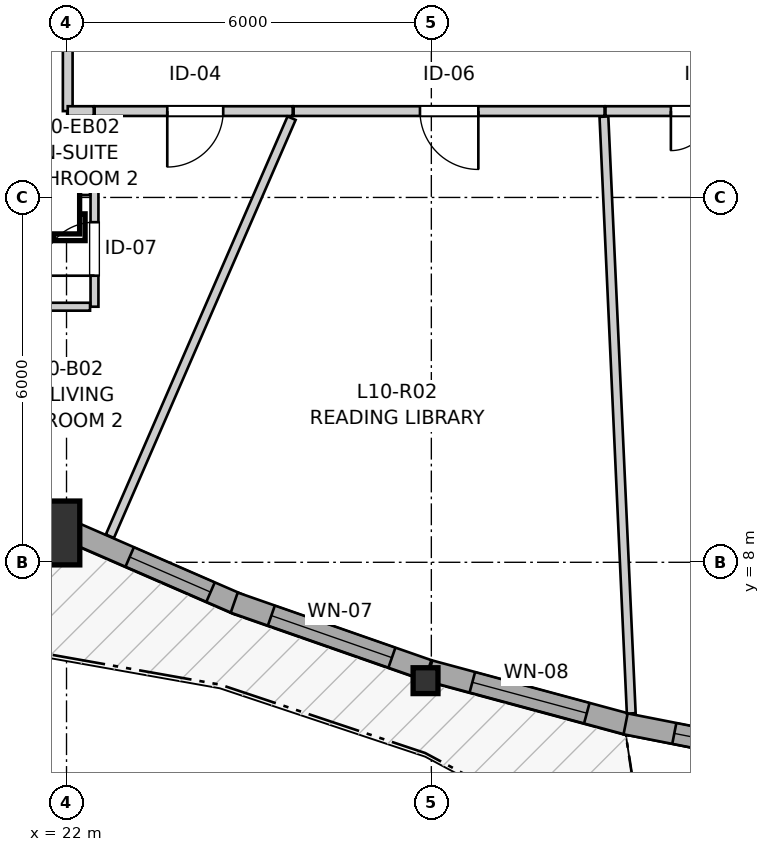
"""IFC4 building model, lengths in metres.
Left out: names, types, materials, properties, quantities, classifications, styles, units other than length and angle.
Written with IfcOpenShell. Run it as: python <this file> out.ifc"""

import sys

from ifc_helpers import new_model, si_unit, direction, frame, frame_2d, origin, origin_2d, place, context, subcontext, project, spatial, rectangle, i_section, extrude, source, transform, mapped, element, fill, save


model = new_model("IFC4")
c1 = context("Model", 3, precision=1e-05, world=origin(), true_north=direction((0.0, 1.0)))
c2 = subcontext(c1, "Body", "Model", "MODEL_VIEW")
j1 = project(units=[si_unit("LENGTHUNIT", "METRE"), si_unit("PLANEANGLEUNIT", "RADIAN")], contexts=[c1])
p1 = place(None, origin())
s1 = spatial("IfcSite", under=j1, at=p1, CompositionType="ELEMENT")
p2 = place(p1, origin())
s2 = spatial("IfcBuilding", under=s1, at=p2, CompositionType="ELEMENT")
p3 = place(p2, frame((0.0, 0.0, 36.6)))
s3 = spatial("IfcBuildingStorey", under=s2, at=p3, CompositionType="ELEMENT", Elevation=36.6)
m1 = source(origin(), c2, "Body", "SweptSolid", [
    extrude(rectangle(XDim=1.05, YDim=1.05, at=origin_2d()), origin(), (0.0, 0.0, 1.0), 2.94),
])
p4 = place(p3, frame((21.693, 8.482, 0.0), z_axis=(0.0, 0.0, 1.0), x_axis=(1.0, 0.0, 0.0)))
e1 = element("IfcColumn", 1, at=p4, inside=s3, PredefinedType="COLUMN", context=c2, shape_type="MappedRepresentation", body=[
    mapped(m1, transform((0.0, 0.0, 0.0), x_axis=(1.0, 0.0, 0.0), y_axis=(0.0, 1.0, 0.0), z_axis=(0.0, 0.0, 1.0), scale=1.0)),
])
m2 = source(origin(), c2, "Body", "SweptSolid", [
    extrude(i_section(OverallWidth=0.409, OverallDepth=0.425, WebThickness=0.03, FlangeThickness=0.048, FilletRadius=0.015, at=origin_2d()), origin(), (0.0, 0.0, 1.0), 2.94),
])
p5 = place(p3, frame((27.905, 6.053, 0.0), z_axis=(0.0, 0.0, 1.0), x_axis=(1.0, 0.0, 0.0)))
e2 = element("IfcColumn", 2, at=p5, inside=s3, PredefinedType="PILASTER", context=c2, shape_type="MappedRepresentation", body=[
    mapped(m2, transform((0.0, 0.0, 0.0), x_axis=(1.0, 0.0, 0.0), y_axis=(0.0, 1.0, 0.0), z_axis=(0.0, 0.0, 1.0), scale=1.0)),
])
p6 = place(p3, frame((22.038, 8.523, 0.0), z_axis=(0.0, 0.0, 1.0), x_axis=(0.91704973522, -0.398772846535, 0.0)))
e3 = element("IfcWall", 3, at=p6, inside=s3, PredefinedType="SOLIDWALL", context=c2, shape_type="SweptSolid", body=[
    extrude(rectangle(XDim=3.056, YDim=0.35, at=frame_2d((1.528, 0.0))), origin(), (0.0, 0.0, 1.0), 2.42),
])
p7 = place(p6, frame((1.092, 0.0, 0.82)))
e4 = element("IfcOpeningElement", 4, at=p7, cuts=e3, PredefinedType="OPENING", context=c2, shape_type="SweptSolid", body=[
    extrude(rectangle(XDim=1.45, YDim=1.25, at=frame_2d((0.725, 0.625))), frame((0.0, 0.185, 0.0), z_axis=(0.0, -1.0, 0.0), x_axis=(1.0, 0.0, 0.0)), (0.0, 0.0, 1.0), 0.37),
])
p8 = place(p3, frame((24.758, 7.337, 0.0), z_axis=(0.0, 0.0, 1.0), x_axis=(0.944146789085, -0.329525174547, 0.0)))
e5 = element("IfcWall", 5, at=p8, inside=s3, PredefinedType="SOLIDWALL", context=c2, shape_type="SweptSolid", body=[
    extrude(rectangle(XDim=3.374, YDim=0.35, at=frame_2d((1.687, 0.0))), origin(), (0.0, 0.0, 1.0), 2.42),
])
p9 = place(p8, frame((0.647, 0.0, 0.82)))
e6 = element("IfcOpeningElement", 6, at=p9, cuts=e5, PredefinedType="OPENING", context=c2, shape_type="SweptSolid", body=[
    extrude(rectangle(XDim=2.1, YDim=1.4, at=frame_2d((1.05, 0.7))), frame((0.0, 0.185, 0.0), z_axis=(0.0, -1.0, 0.0), x_axis=(1.0, 0.0, 0.0)), (0.0, 0.0, 1.0), 0.37),
])
p10 = place(p3, frame((27.969, 6.217, 0.0), z_axis=(0.0, 0.0, 1.0), x_axis=(0.965465079887, -0.26053249225, 0.0)))
e7 = element("IfcWall", 7, at=p10, inside=s3, PredefinedType="SOLIDWALL", context=c2, shape_type="SweptSolid", body=[
    extrude(rectangle(XDim=3.43, YDim=0.35, at=frame_2d((1.715, 0.0))), origin(), (0.0, 0.0, 1.0), 2.42),
])
p11 = place(p10, frame((0.73, 0.0, 0.82)))
e8 = element("IfcOpeningElement", 8, at=p11, cuts=e7, PredefinedType="OPENING", context=c2, shape_type="SweptSolid", body=[
    extrude(rectangle(XDim=1.95, YDim=1.4, at=frame_2d((0.975, 0.7))), frame((0.0, 0.185, 0.0), z_axis=(0.0, -1.0, 0.0), x_axis=(1.0, 0.0, 0.0)), (0.0, 0.0, 1.0), 0.37),
])
p12 = place(p3, frame((31.195, 5.343, 0.0), z_axis=(0.0, 0.0, 1.0), x_axis=(0.981233720322, -0.192822161858, 0.0)))
e9 = element("IfcWall", 9, at=p12, inside=s3, PredefinedType="SOLIDWALL", context=c2, shape_type="SweptSolid", body=[
    extrude(rectangle(XDim=3.222, YDim=0.35, at=frame_2d((1.611, 0.0))), origin(), (0.0, 0.0, 1.0), 2.42),
])
p13 = place(p12, frame((0.816, 0.0, 0.82)))
e10 = element("IfcOpeningElement", 10, at=p13, cuts=e9, PredefinedType="OPENING", context=c2, shape_type="SweptSolid", body=[
    extrude(rectangle(XDim=1.6, YDim=1.35, at=frame_2d((0.8, 0.675))), frame((0.0, 0.185, 0.0), z_axis=(0.0, -1.0, 0.0), x_axis=(1.0, 0.0, 0.0)), (0.0, 0.0, 1.0), 0.37),
])
p14 = place(p3, frame((30.849, 15.42, 0.0), z_axis=(0.0, 0.0, 1.0), x_axis=(-1.0, 0.0, 0.0)))
e11 = element("IfcWall", 11, at=p14, inside=s3, PredefinedType="PARTITIONING", context=c2, shape_type="SweptSolid", body=[
    extrude(rectangle(XDim=5.114, YDim=0.16, at=frame_2d((2.557, 0.0))), origin(), (0.0, 0.0, 1.0), 2.94),
])
p15 = place(p14, frame((2.076, 0.0, 0.0)))
e12 = element("IfcOpeningElement", 12, at=p15, cuts=e11, PredefinedType="OPENING", context=c2, shape_type="SweptSolid", body=[
    extrude(rectangle(XDim=0.96, YDim=2.1, at=frame_2d((0.48, 1.05))), frame((0.0, 0.09, 0.0), z_axis=(0.0, -1.0, 0.0), x_axis=(1.0, 0.0, 0.0)), (0.0, 0.0, 1.0), 0.18),
])
p16 = place(p3, frame((34.361, 15.42, 0.0), z_axis=(0.0, 0.0, 1.0), x_axis=(-1.0, 0.0, 0.0)))
e13 = element("IfcWall", 13, at=p16, inside=s3, PredefinedType="PARTITIONING", context=c2, shape_type="SweptSolid", body=[
    extrude(rectangle(XDim=3.497, YDim=0.16, at=frame_2d((1.749, 0.0))), origin(), (0.0, 0.0, 1.0), 2.94),
])
p17 = place(p16, frame((1.122, 0.0, 0.0)))
e14 = element("IfcOpeningElement", 14, at=p17, cuts=e13, PredefinedType="OPENING", context=c2, shape_type="SweptSolid", body=[
    extrude(rectangle(XDim=1.3, YDim=2.1, at=frame_2d((0.65, 1.05))), frame((0.0, 0.09, 0.0), z_axis=(0.0, -1.0, 0.0), x_axis=(1.0, 0.0, 0.0)), (0.0, 0.0, 1.0), 0.18),
])
p18 = place(p3, frame((22.02, 15.42, 0.0), z_axis=(0.0, 0.0, 1.0), x_axis=(0.0, 1.0, 0.0)))
e15 = element("IfcWall", 15, at=p18, inside=s3, PredefinedType="PARTITIONING", context=c2, shape_type="SweptSolid", body=[
    extrude(rectangle(XDim=3.287, YDim=0.16, at=frame_2d((1.644, 0.0))), origin(), (0.0, 0.0, 1.0), 2.94),
])
p19 = place(p18, frame((1.201, 0.0, 0.0)))
e16 = element("IfcOpeningElement", 16, at=p19, cuts=e15, PredefinedType="OPENING", context=c2, shape_type="SweptSolid", body=[
    extrude(rectangle(XDim=0.92, YDim=2.1, at=frame_2d((0.46, 1.05))), frame((0.0, 0.09, 0.0), z_axis=(0.0, -1.0, 0.0), x_axis=(1.0, 0.0, 0.0)), (0.0, 0.0, 1.0), 0.18),
])
p20 = place(p3, frame((25.72, 15.42, 0.0), z_axis=(0.0, 0.0, 1.0), x_axis=(-1.0, 0.0, 0.0)))
e17 = element("IfcWall", 17, at=p20, inside=s3, PredefinedType="PARTITIONING", context=c2, shape_type="SweptSolid", body=[
    extrude(rectangle(XDim=3.257, YDim=0.16, at=frame_2d((1.628, 0.0))), origin(), (0.0, 0.0, 1.0), 2.94),
])
p21 = place(p20, frame((1.143, 0.0, 0.0)))
e18 = element("IfcOpeningElement", 18, at=p21, cuts=e17, PredefinedType="OPENING", context=c2, shape_type="SweptSolid", body=[
    extrude(rectangle(XDim=0.92, YDim=2.1, at=frame_2d((0.46, 1.05))), frame((0.0, 0.09, 0.0), z_axis=(0.0, -1.0, 0.0), x_axis=(1.0, 0.0, 0.0)), (0.0, 0.0, 1.0), 0.18),
])
p22 = place(p3, frame((22.46, 12.203, 0.0), z_axis=(0.0, 0.0, 1.0), x_axis=(0.0, 1.0, 0.0)))
e19 = element("IfcWall", 19, at=p22, inside=s3, PredefinedType="PARTITIONING", context=c2, shape_type="SweptSolid", body=[
    extrude(rectangle(XDim=1.9, YDim=0.13, at=frame_2d((0.95, 0.0))), origin(), (0.0, 0.0, 1.0), 2.94),
])
p23 = place(p22, frame((0.51, 0.0, 0.0)))
e20 = element("IfcOpeningElement", 20, at=p23, cuts=e19, PredefinedType="OPENING", context=c2, shape_type="SweptSolid", body=[
    extrude(rectangle(XDim=0.88, YDim=2.05, at=frame_2d((0.44, 1.025))), frame((0.0, 0.075, 0.0), z_axis=(0.0, -1.0, 0.0), x_axis=(1.0, 0.0, 0.0)), (0.0, 0.0, 1.0), 0.15),
])
p24 = place(p3, frame((30.838, 15.329, 0.0), z_axis=(0.0, 0.0, 1.0), x_axis=(0.045777414824, -0.998951664642, 0.0)))
e21 = element("IfcWall", 21, at=p24, inside=s3, PredefinedType="PARTITIONING", context=c2, shape_type="SweptSolid", body=[
    extrude(rectangle(XDim=9.824, YDim=0.145, at=frame_2d((4.912, 0.0))), origin(), (0.0, 0.0, 1.0), 2.94),
])
p25 = place(p3, frame((22.713, 8.429, 0.0), z_axis=(0.0, 0.0, 1.0), x_axis=(0.398615352261, 0.917118204454, 0.0)))
e22 = element("IfcWall", 22, at=p25, inside=s3, PredefinedType="PARTITIONING", context=c2, shape_type="SweptSolid", body=[
    extrude(rectangle(XDim=7.496, YDim=0.145, at=frame_2d((3.748, 0.0))), origin(), (0.0, 0.0, 1.0), 2.94),
])
p26 = place(p3, frame((18.614, 15.774, 0.0), z_axis=(0.0, 0.0, 1.0), x_axis=(0.753902736672, 0.656986045239, 0.0)))
e23 = element("IfcWall", 23, at=p26, inside=s3, PredefinedType="PARTITIONING", context=c2, shape_type="SweptSolid", body=[
    extrude(rectangle(XDim=4.34, YDim=0.145, at=frame_2d((2.17, 0.0))), origin(), (0.0, 0.0, 1.0), 2.94),
])
p27 = place(p3, frame((20.66, 12.203, 0.0), z_axis=(0.0, 0.0, 1.0), x_axis=(1.0, 0.0, 0.0)))
e24 = element("IfcWall", 24, at=p27, inside=s3, PredefinedType="PARTITIONING", context=c2, shape_type="SweptSolid", body=[
    extrude(rectangle(XDim=1.727, YDim=0.13, at=frame_2d((0.864, 0.0))), origin(), (0.0, 0.0, 1.0), 2.94),
])
p28 = place(p3, frame((21.491, 14.088, 0.0), z_axis=(0.0, 0.0, 1.0), x_axis=(0.596893728005, 0.802320308523, 0.0)))
e25 = element("IfcWall", 25, at=p28, inside=s3, PredefinedType="PARTITIONING", context=c2, shape_type="SweptSolid", body=[
    extrude(rectangle(XDim=1.499, YDim=0.145, at=frame_2d((0.749, 0.0))), origin(), (0.0, 0.0, 1.0), 2.94),
])
p29 = place(p3, frame((21.649, 14.103, 0.0), z_axis=(0.0, 0.0, 1.0), x_axis=(1.0, 0.0, 0.0)))
e26 = element("IfcWall", 26, at=p29, inside=s3, PredefinedType="PARTITIONING", context=c2, shape_type="SweptSolid", body=[
    extrude(rectangle(XDim=0.738, YDim=0.13, at=frame_2d((0.369, 0.0))), origin(), (0.0, 0.0, 1.0), 2.94),
])
p30 = place(p3, frame((22.02, 15.42, 0.0), z_axis=(0.0, 0.0, 1.0), x_axis=(1.0, 0.0, 0.0)))
e27 = element("IfcWall", 27, at=p30, inside=s3, PredefinedType="PARTITIONING", context=c2, shape_type="SweptSolid", body=[
    extrude(rectangle(XDim=0.428, YDim=0.16, at=frame_2d((0.214, 0.0))), origin(), (0.0, 0.0, 1.0), 2.94),
])
m3 = source(origin(), c2, "Body", "SweptSolid", [
    extrude(rectangle(XDim=1.45, YDim=1.25, at=frame_2d((0.725, 0.625))), frame((0.0, 0.03, 0.0), z_axis=(0.0, -1.0, 0.0), x_axis=(1.0, 0.0, 0.0)), (0.0, 0.0, 1.0), 0.06),
])
p31 = place(p7, origin())
e28 = element("IfcWindow", 28, at=p31, inside=s3, PartitioningType="SINGLE_PANEL", PredefinedType="WINDOW", context=c2, shape_type="MappedRepresentation", body=[
    mapped(m3, transform((0.0, 0.0, 0.0), x_axis=(1.0, 0.0, 0.0), y_axis=(0.0, 1.0, 0.0), z_axis=(0.0, 0.0, 1.0), scale=1.0)),
])
fill(e4, e28)
m4 = source(origin(), c2, "Body", "SweptSolid", [
    extrude(rectangle(XDim=2.1, YDim=1.4, at=frame_2d((1.05, 0.7))), frame((0.0, 0.03, 0.0), z_axis=(0.0, -1.0, 0.0), x_axis=(1.0, 0.0, 0.0)), (0.0, 0.0, 1.0), 0.06),
])
p32 = place(p9, origin())
e29 = element("IfcWindow", 29, at=p32, inside=s3, PartitioningType="SINGLE_PANEL", PredefinedType="WINDOW", context=c2, shape_type="MappedRepresentation", body=[
    mapped(m4, transform((0.0, 0.0, 0.0), x_axis=(1.0, 0.0, 0.0), y_axis=(0.0, 1.0, 0.0), z_axis=(0.0, 0.0, 1.0), scale=1.0)),
])
fill(e6, e29)
m5 = source(origin(), c2, "Body", "SweptSolid", [
    extrude(rectangle(XDim=1.95, YDim=1.4, at=frame_2d((0.975, 0.7))), frame((0.0, 0.03, 0.0), z_axis=(0.0, -1.0, 0.0), x_axis=(1.0, 0.0, 0.0)), (0.0, 0.0, 1.0), 0.06),
])
p33 = place(p11, origin())
e30 = element("IfcWindow", 30, at=p33, inside=s3, PartitioningType="SINGLE_PANEL", PredefinedType="WINDOW", context=c2, shape_type="MappedRepresentation", body=[
    mapped(m5, transform((0.0, 0.0, 0.0), x_axis=(1.0, 0.0, 0.0), y_axis=(0.0, 1.0, 0.0), z_axis=(0.0, 0.0, 1.0), scale=1.0)),
])
fill(e8, e30)
m6 = source(origin(), c2, "Body", "SweptSolid", [
    extrude(rectangle(XDim=1.6, YDim=1.35, at=frame_2d((0.8, 0.675))), frame((0.0, 0.03, 0.0), z_axis=(0.0, -1.0, 0.0), x_axis=(1.0, 0.0, 0.0)), (0.0, 0.0, 1.0), 0.06),
])
p34 = place(p13, origin())
e31 = element("IfcWindow", 31, at=p34, inside=s3, PartitioningType="SINGLE_PANEL", PredefinedType="WINDOW", context=c2, shape_type="MappedRepresentation", body=[
    mapped(m6, transform((0.0, 0.0, 0.0), x_axis=(1.0, 0.0, 0.0), y_axis=(0.0, 1.0, 0.0), z_axis=(0.0, 0.0, 1.0), scale=1.0)),
])
fill(e10, e31)
m7 = source(origin(), c2, "Body", "SweptSolid", [
    extrude(rectangle(XDim=0.96, YDim=2.1, at=frame_2d((0.48, 1.05))), frame((0.0, 0.025, 0.0), z_axis=(0.0, -1.0, 0.0), x_axis=(1.0, 0.0, 0.0)), (0.0, 0.0, 1.0), 0.05),
])
p35 = place(p15, origin())
e32 = element("IfcDoor", 32, at=p35, inside=s3, OperationType="SINGLE_SWING_LEFT", PredefinedType="DOOR", context=c2, shape_type="MappedRepresentation", body=[
    mapped(m7, transform((0.0, 0.0, 0.0), x_axis=(1.0, 0.0, 0.0), y_axis=(0.0, 1.0, 0.0), z_axis=(0.0, 0.0, 1.0), scale=1.0)),
])
fill(e12, e32)
m8 = source(origin(), c2, "Body", "SweptSolid", [
    extrude(rectangle(XDim=1.3, YDim=2.1, at=frame_2d((0.65, 1.05))), frame((0.0, 0.025, 0.0), z_axis=(0.0, -1.0, 0.0), x_axis=(1.0, 0.0, 0.0)), (0.0, 0.0, 1.0), 0.05),
])
p36 = place(p17, origin())
e33 = element("IfcDoor", 33, at=p36, inside=s3, OperationType="DOUBLE_DOOR_SINGLE_SWING", PredefinedType="DOOR", context=c2, shape_type="MappedRepresentation", body=[
    mapped(m8, transform((0.0, 0.0, 0.0), x_axis=(1.0, 0.0, 0.0), y_axis=(0.0, 1.0, 0.0), z_axis=(0.0, 0.0, 1.0), scale=1.0)),
])
fill(e14, e33)
m9 = source(origin(), c2, "Body", "SweptSolid", [
    extrude(rectangle(XDim=0.92, YDim=2.1, at=frame_2d((0.46, 1.05))), frame((0.0, 0.025, 0.0), z_axis=(0.0, -1.0, 0.0), x_axis=(1.0, 0.0, 0.0)), (0.0, 0.0, 1.0), 0.05),
])
p37 = place(p21, origin())
e34 = element("IfcDoor", 34, at=p37, inside=s3, OperationType="SINGLE_SWING_RIGHT", PredefinedType="DOOR", context=c2, shape_type="MappedRepresentation", body=[
    mapped(m9, transform((0.0, 0.0, 0.0), x_axis=(1.0, 0.0, 0.0), y_axis=(0.0, 1.0, 0.0), z_axis=(0.0, 0.0, 1.0), scale=1.0)),
])
fill(e18, e34)
m10 = source(origin(), c2, "Body", "SweptSolid", [
    extrude(rectangle(XDim=0.88, YDim=2.05, at=frame_2d((0.44, 1.025))), frame((0.0, 0.025, 0.0), z_axis=(0.0, -1.0, 0.0), x_axis=(1.0, 0.0, 0.0)), (0.0, 0.0, 1.0), 0.05),
])
p38 = place(p23, origin())
e35 = element("IfcDoor", 35, at=p38, inside=s3, OperationType="SINGLE_SWING_LEFT", PredefinedType="DOOR", context=c2, shape_type="MappedRepresentation", body=[
    mapped(m10, transform((0.0, 0.0, 0.0), x_axis=(1.0, 0.0, 0.0), y_axis=(0.0, 1.0, 0.0), z_axis=(0.0, 0.0, 1.0), scale=1.0)),
])
fill(e20, e35)
save(model, sys.argv[1])
